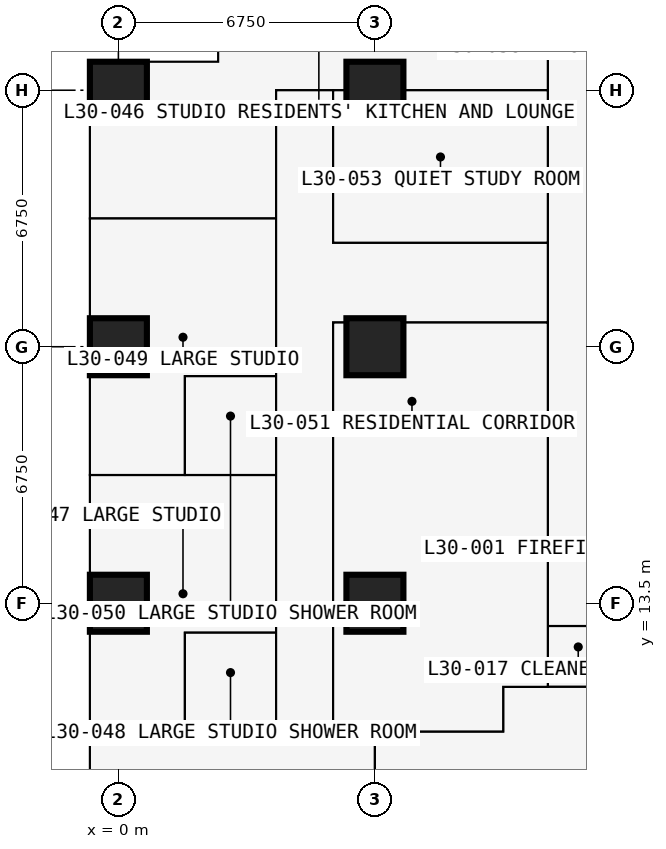
"""IFC4 building model, lengths in metres.
Left out: names, types, materials, properties, quantities, classifications, styles, units other than length and angle.
Written with IfcOpenShell. Run it as: python <this file> out.ifc"""

import sys

from ifc_helpers import new_model, si_unit, direction, frame, frame_2d, origin, origin_2d, place, context, subcontext, project, spatial, rectangle, extrude, element, fill, save


model = new_model("IFC4")
c1 = context("Model", 3, precision=1e-05, world=origin(), true_north=direction((0.0, 1.0)))
c2 = subcontext(c1, "Body", "Model", "MODEL_VIEW")
j1 = project(units=[si_unit("LENGTHUNIT", "METRE"), si_unit("PLANEANGLEUNIT", "RADIAN")], contexts=[c1])
p1 = place(None, origin())
s1 = spatial("IfcSite", under=j1, at=p1, CompositionType="ELEMENT")
p2 = place(p1, origin())
s2 = spatial("IfcBuilding", under=s1, at=p2, CompositionType="ELEMENT")
p3 = place(p2, frame((0.0, 0.0, 112.5)))
s3 = spatial("IfcBuildingStorey", under=s2, at=p3, CompositionType="ELEMENT", Elevation=112.5)
for number, where, z_axis, x_axis in (
    (1, (0.0, 13.5, 0.0), (0.0, 0.0, 1.0), (1.0, 0.0, 0.0)),
    (2, (0.0, 20.25, 0.0), (0.0, 0.0, 1.0), (1.0, 0.0, 0.0)),
    (3, (0.0, 27.0, 0.0), (0.0, 0.0, 1.0), (1.0, 0.0, 0.0)),
    (4, (6.75, 13.5, 0.0), (0.0, 0.0, 1.0), (1.0, 0.0, 0.0)),
    (5, (6.75, 20.25, 0.0), (0.0, 0.0, 1.0), (1.0, 0.0, 0.0)),
    (6, (6.75, 27.0, 0.0), (0.0, 0.0, 1.0), (1.0, 0.0, 0.0)),
):
    element("IfcColumn", number, at=place(p3, frame(where, z_axis=z_axis, x_axis=x_axis)), inside=s3, PredefinedType="COLUMN", context=c2, shape_type="SweptSolid", body=[
        extrude(rectangle(XDim=1.5, YDim=1.5, at=origin_2d()), origin(), (0.0, 0.0, 1.0), 3.6),
    ])
p4 = place(p3, frame((2.625, 31.125, 0.0), z_axis=(0.0, 0.0, 1.0), x_axis=(0.0, -1.0, 0.0)))
e7 = element("IfcWall", 7, at=p4, inside=s3, PredefinedType="SOLIDWALL", context=c2, shape_type="SweptSolid", body=[
    extrude(rectangle(XDim=3.375, YDim=0.3, at=frame_2d((1.688, 0.0))), origin(), (0.0, 0.0, 1.0), 3.375),
])
p5 = place(p4, frame((0.788, 0.0, 0.6)))
e8 = element("IfcOpeningElement", 8, at=p5, cuts=e7, PredefinedType="OPENING", context=c2, shape_type="SweptSolid", body=[
    extrude(rectangle(XDim=1.8, YDim=2.1, at=frame_2d((0.9, 1.05))), frame((0.0, 0.16, 0.0), z_axis=(0.0, -1.0, 0.0), x_axis=(1.0, 0.0, 0.0)), (0.0, 0.0, 1.0), 0.32),
])
p6 = place(p3, frame((2.625, 27.75, 0.0), z_axis=(0.0, 0.0, 1.0), x_axis=(-1.0, 0.0, 0.0)))
e9 = element("IfcWall", 9, at=p6, inside=s3, PredefinedType="SOLIDWALL", context=c2, shape_type="SweptSolid", body=[
    extrude(rectangle(XDim=3.375, YDim=0.3, at=frame_2d((1.688, 0.0))), origin(), (0.0, 0.0, 1.0), 3.375),
])
p7 = place(p6, frame((0.268, 0.0, 0.9)))
e10 = element("IfcOpeningElement", 10, at=p7, cuts=e9, PredefinedType="OPENING", context=c2, shape_type="SweptSolid", body=[
    extrude(rectangle(XDim=1.5, YDim=1.8, at=frame_2d((0.75, 0.9))), frame((0.0, 0.16, 0.0), z_axis=(0.0, -1.0, 0.0), x_axis=(1.0, 0.0, 0.0)), (0.0, 0.0, 1.0), 0.32),
])
p8 = place(p3, frame((-0.734, 10.125, 0.0), z_axis=(0.0, 0.0, 1.0), x_axis=(1.0, 0.0, 0.0)))
e11 = element("IfcWall", 11, at=p8, inside=s3, PredefinedType="PARTITIONING", context=c2, shape_type="SweptSolid", body=[
    extrude(rectangle(XDim=10.859, YDim=0.15, at=frame_2d((5.429, 0.0))), origin(), (0.0, 0.0, 1.0), 3.375),
])
p9 = place(p3, frame((-0.734, 16.875, 0.0), z_axis=(0.0, 0.0, 1.0), x_axis=(1.0, 0.0, 0.0)))
e12 = element("IfcWall", 12, at=p9, inside=s3, PredefinedType="PARTITIONING", context=c2, shape_type="SweptSolid", body=[
    extrude(rectangle(XDim=4.884, YDim=0.175, at=frame_2d((2.442, 0.0))), origin(), (0.0, 0.0, 1.0), 3.375),
])
p10 = place(p9, frame((3.234, 0.0, 0.0)))
e13 = element("IfcOpeningElement", 13, at=p10, cuts=e12, PredefinedType="OPENING", context=c2, shape_type="SweptSolid", body=[
    extrude(rectangle(XDim=0.9, YDim=2.2, at=frame_2d((0.45, 1.1))), frame((0.0, 0.097, 0.0), z_axis=(0.0, -1.0, 0.0), x_axis=(1.0, 0.0, 0.0)), (0.0, 0.0, 1.0), 0.195),
])
p11 = place(p3, frame((-0.734, 23.625, 0.0), z_axis=(0.0, 0.0, 1.0), x_axis=(1.0, 0.0, 0.0)))
e14 = element("IfcWall", 14, at=p11, inside=s3, PredefinedType="PARTITIONING", context=c2, shape_type="SweptSolid", body=[
    extrude(rectangle(XDim=4.884, YDim=0.15, at=frame_2d((2.442, 0.0))), origin(), (0.0, 0.0, 1.0), 3.375),
])
p12 = place(p3, frame((1.75, 10.125, 0.0), z_axis=(0.0, 0.0, 1.0), x_axis=(0.0, 1.0, 0.0)))
e15 = element("IfcWall", 15, at=p12, inside=s3, PredefinedType="PARTITIONING", context=c2, shape_type="SweptSolid", body=[
    extrude(rectangle(XDim=2.6, YDim=0.1, at=frame_2d((1.3, 0.0))), origin(), (0.0, 0.0, 1.0), 3.375),
])
p13 = place(p12, frame((0.85, 0.0, 0.0)))
e16 = element("IfcOpeningElement", 16, at=p13, cuts=e15, PredefinedType="OPENING", context=c2, shape_type="SweptSolid", body=[
    extrude(rectangle(XDim=0.9, YDim=2.2, at=frame_2d((0.45, 1.1))), frame((0.0, 0.06, 0.0), z_axis=(0.0, -1.0, 0.0), x_axis=(1.0, 0.0, 0.0)), (0.0, 0.0, 1.0), 0.12),
])
p14 = place(p3, frame((1.75, 12.725, 0.0), z_axis=(0.0, 0.0, 1.0), x_axis=(1.0, 0.0, 0.0)))
e17 = element("IfcWall", 17, at=p14, inside=s3, PredefinedType="PARTITIONING", context=c2, shape_type="SweptSolid", body=[
    extrude(rectangle(XDim=2.4, YDim=0.1, at=frame_2d((1.2, 0.0))), origin(), (0.0, 0.0, 1.0), 3.375),
])
p15 = place(p3, frame((1.75, 16.875, 0.0), z_axis=(0.0, 0.0, 1.0), x_axis=(0.0, 1.0, 0.0)))
e18 = element("IfcWall", 18, at=p15, inside=s3, PredefinedType="PARTITIONING", context=c2, shape_type="SweptSolid", body=[
    extrude(rectangle(XDim=2.6, YDim=0.1, at=frame_2d((1.3, 0.0))), origin(), (0.0, 0.0, 1.0), 3.375),
])
p16 = place(p3, frame((1.75, 19.475, 0.0), z_axis=(0.0, 0.0, 1.0), x_axis=(1.0, 0.0, 0.0)))
e19 = element("IfcWall", 19, at=p16, inside=s3, PredefinedType="PARTITIONING", context=c2, shape_type="SweptSolid", body=[
    extrude(rectangle(XDim=2.4, YDim=0.1, at=frame_2d((1.2, 0.0))), origin(), (0.0, 0.0, 1.0), 3.375),
])
p17 = place(p3, frame((4.15, 10.125, 0.0), z_axis=(0.0, 0.0, 1.0), x_axis=(0.0, 1.0, 0.0)))
e20 = element("IfcWall", 20, at=p17, inside=s3, PredefinedType="PARTITIONING", context=c2, shape_type="SweptSolid", body=[
    extrude(rectangle(XDim=16.875, YDim=0.1, at=frame_2d((8.438, 0.0))), origin(), (0.0, 0.0, 1.0), 3.375),
])
p18 = place(p17, frame((4.2, 0.0, 0.0)))
e21 = element("IfcOpeningElement", 21, at=p18, cuts=e20, PredefinedType="OPENING", context=c2, shape_type="SweptSolid", body=[
    extrude(rectangle(XDim=0.95, YDim=2.2, at=frame_2d((0.475, 1.1))), frame((0.0, 0.06, 0.0), z_axis=(0.0, -1.0, 0.0), x_axis=(1.0, 0.0, 0.0)), (0.0, 0.0, 1.0), 0.12),
])
p19 = place(p17, frame((10.95, 0.0, 0.0)))
e22 = element("IfcOpeningElement", 22, at=p19, cuts=e20, PredefinedType="OPENING", context=c2, shape_type="SweptSolid", body=[
    extrude(rectangle(XDim=0.95, YDim=2.2, at=frame_2d((0.475, 1.1))), frame((0.0, 0.06, 0.0), z_axis=(0.0, -1.0, 0.0), x_axis=(1.0, 0.0, 0.0)), (0.0, 0.0, 1.0), 0.12),
])
p20 = place(p3, frame((4.15, 27.0, 0.0), z_axis=(0.0, 0.0, 1.0), x_axis=(1.0, 0.0, 0.0)))
e23 = element("IfcWall", 23, at=p20, inside=s3, PredefinedType="PARTITIONING", context=c2, shape_type="SweptSolid", body=[
    extrude(rectangle(XDim=7.15, YDim=0.15, at=frame_2d((3.575, 0.0))), origin(), (0.0, 0.0, 1.0), 2.806),
])
p21 = place(p3, frame((5.65, 10.125, 0.0), z_axis=(0.0, 0.0, 1.0), x_axis=(0.0, 1.0, 0.0)))
e24 = element("IfcWall", 24, at=p21, inside=s3, PredefinedType="PARTITIONING", context=c2, shape_type="SweptSolid", body=[
    extrude(rectangle(XDim=10.762, YDim=0.15, at=frame_2d((5.381, 0.0))), origin(), (0.0, 0.0, 1.0), 3.375),
])
p22 = place(p21, frame((4.9, 0.0, 0.0)))
e25 = element("IfcOpeningElement", 25, at=p22, cuts=e24, PredefinedType="OPENING", context=c2, shape_type="SweptSolid", body=[
    extrude(rectangle(XDim=0.95, YDim=2.2, at=frame_2d((0.475, 1.1))), frame((0.0, 0.085, 0.0), z_axis=(0.0, -1.0, 0.0), x_axis=(1.0, 0.0, 0.0)), (0.0, 0.0, 1.0), 0.17),
])
p23 = place(p3, frame((5.65, 20.887, 0.0), z_axis=(0.0, 0.0, 1.0), x_axis=(1.0, 0.0, 0.0)))
e26 = element("IfcWall", 26, at=p23, inside=s3, PredefinedType="PARTITIONING", context=c2, shape_type="SweptSolid", body=[
    extrude(rectangle(XDim=5.65, YDim=0.15, at=frame_2d((2.825, 0.0))), origin(), (0.0, 0.0, 1.0), 3.375),
])
p24 = place(p3, frame((5.65, 22.988, 0.0), z_axis=(0.0, 0.0, 1.0), x_axis=(0.0, 1.0, 0.0)))
e27 = element("IfcWall", 27, at=p24, inside=s3, PredefinedType="PARTITIONING", context=c2, shape_type="SweptSolid", body=[
    extrude(rectangle(XDim=4.012, YDim=0.15, at=frame_2d((2.006, 0.0))), origin(), (0.0, 0.0, 1.0), 3.375),
])
p25 = place(p3, frame((5.65, 22.988, 0.0), z_axis=(0.0, 0.0, 1.0), x_axis=(1.0, 0.0, 0.0)))
e28 = element("IfcWall", 28, at=p25, inside=s3, PredefinedType="PARTITIONING", context=c2, shape_type="SweptSolid", body=[
    extrude(rectangle(XDim=5.65, YDim=0.15, at=frame_2d((2.825, 0.0))), origin(), (0.0, 0.0, 1.0), 3.375),
])
p26 = place(p25, frame((2.35, 0.0, 0.0)))
e29 = element("IfcOpeningElement", 29, at=p26, cuts=e28, PredefinedType="OPENING", context=c2, shape_type="SweptSolid", body=[
    extrude(rectangle(XDim=0.95, YDim=2.2, at=frame_2d((0.475, 1.1))), frame((0.0, 0.085, 0.0), z_axis=(0.0, -1.0, 0.0), x_axis=(1.0, 0.0, 0.0)), (0.0, 0.0, 1.0), 0.17),
])
p27 = place(p3, frame((6.75, 4.15, 0.0), z_axis=(0.0, 0.0, 1.0), x_axis=(0.0, 1.0, 0.0)))
e30 = element("IfcWall", 30, at=p27, inside=s3, PredefinedType="PARTITIONING", context=c2, shape_type="SweptSolid", body=[
    extrude(rectangle(XDim=5.975, YDim=0.15, at=frame_2d((2.988, 0.0))), origin(), (0.0, 0.0, 1.0), 2.877),
])
p28 = place(p3, frame((10.125, 10.125, 0.0), z_axis=(0.0, 0.0, 1.0), x_axis=(0.0, 1.0, 0.0)))
e31 = element("IfcWall", 31, at=p28, inside=s3, PredefinedType="PARTITIONING", context=c2, shape_type="SweptSolid", body=[
    extrude(rectangle(XDim=1.175, YDim=0.15, at=frame_2d((0.587, 0.0))), origin(), (0.0, 0.0, 1.0), 3.375),
])
p29 = place(p3, frame((10.125, 11.3, 0.0), z_axis=(0.0, 0.0, 1.0), x_axis=(1.0, 0.0, 0.0)))
e32 = element("IfcWall", 32, at=p29, inside=s3, PredefinedType="PARTITIONING", context=c2, shape_type="SweptSolid", body=[
    extrude(rectangle(XDim=20.675, YDim=0.15, at=frame_2d((10.337, 0.0))), origin(), (0.0, 0.0, 1.0), 3.375),
])
p30 = place(p29, frame((11.312, 0.0, 0.0)))
e33 = element("IfcOpeningElement", 33, at=p30, cuts=e32, PredefinedType="OPENING", context=c2, shape_type="SweptSolid", body=[
    extrude(rectangle(XDim=1.0, YDim=2.2, at=frame_2d((0.5, 1.1))), frame((0.0, 0.085, 0.0), z_axis=(0.0, -1.0, 0.0), x_axis=(1.0, 0.0, 0.0)), (0.0, 0.0, 1.0), 0.17),
])
p31 = place(p3, frame((11.3, 11.3, 0.0), z_axis=(0.0, 0.0, 1.0), x_axis=(0.0, 1.0, 0.0)))
e34 = element("IfcWall", 34, at=p31, inside=s3, PredefinedType="PARTITIONING", context=c2, shape_type="SweptSolid", body=[
    extrude(rectangle(XDim=19.3, YDim=0.15, at=frame_2d((9.65, 0.0))), origin(), (0.0, 0.0, 1.0), 3.375),
])
p32 = place(p31, frame((18.1, 0.0, 0.0)))
e35 = element("IfcOpeningElement", 35, at=p32, cuts=e34, PredefinedType="OPENING", context=c2, shape_type="SweptSolid", body=[
    extrude(rectangle(XDim=1.0, YDim=2.2, at=frame_2d((0.5, 1.1))), frame((0.0, 0.085, 0.0), z_axis=(0.0, -1.0, 0.0), x_axis=(1.0, 0.0, 0.0)), (0.0, 0.0, 1.0), 0.17),
])
p33 = place(p31, frame((10.137, 0.0, 0.0)))
e36 = element("IfcOpeningElement", 36, at=p33, cuts=e34, PredefinedType="OPENING", context=c2, shape_type="SweptSolid", body=[
    extrude(rectangle(XDim=1.0, YDim=2.2, at=frame_2d((0.5, 1.1))), frame((0.0, 0.085, 0.0), z_axis=(0.0, -1.0, 0.0), x_axis=(1.0, 0.0, 0.0)), (0.0, 0.0, 1.0), 0.17),
])
p34 = place(p3, frame((11.3, 12.9, 0.0), z_axis=(0.0, 0.0, 1.0), x_axis=(1.0, 0.0, 0.0)))
e37 = element("IfcWall", 37, at=p34, inside=s3, PredefinedType="PARTITIONING", context=c2, shape_type="SweptSolid", body=[
    extrude(rectangle(XDim=1.6, YDim=0.15, at=frame_2d((0.8, 0.0))), origin(), (0.0, 0.0, 1.0), 2.806),
])
p35 = place(p34, frame((0.3, 0.0, 0.0)))
e38 = element("IfcOpeningElement", 38, at=p35, cuts=e37, PredefinedType="OPENING", context=c2, shape_type="SweptSolid", body=[
    extrude(rectangle(XDim=0.95, YDim=2.2, at=frame_2d((0.475, 1.1))), frame((0.0, 0.085, 0.0), z_axis=(0.0, -1.0, 0.0), x_axis=(1.0, 0.0, 0.0)), (0.0, 0.0, 1.0), 0.17),
])
p36 = place(p7, origin())
e39 = element("IfcWindow", 39, at=p36, inside=s3, PartitioningType="SINGLE_PANEL", PredefinedType="WINDOW", context=c2, shape_type="SweptSolid", body=[
    extrude(rectangle(XDim=1.5, YDim=1.8, at=frame_2d((0.75, 0.9))), frame((0.0, 0.03, 0.0), z_axis=(0.0, -1.0, 0.0), x_axis=(1.0, 0.0, 0.0)), (0.0, 0.0, 1.0), 0.06),
])
fill(e10, e39)
p37 = place(p35, origin())
e40 = element("IfcDoor", 40, at=p37, inside=s3, OperationType="SINGLE_SWING_LEFT", PredefinedType="DOOR", context=c2, shape_type="SweptSolid", body=[
    extrude(rectangle(XDim=0.95, YDim=2.2, at=frame_2d((0.475, 1.1))), frame((0.0, 0.025, 0.0), z_axis=(0.0, -1.0, 0.0), x_axis=(1.0, 0.0, 0.0)), (0.0, 0.0, 1.0), 0.05),
])
fill(e38, e40)
p38 = place(p18, origin())
e41 = element("IfcDoor", 41, at=p38, inside=s3, OperationType="SINGLE_SWING_LEFT", PredefinedType="DOOR", context=c2, shape_type="SweptSolid", body=[
    extrude(rectangle(XDim=0.95, YDim=2.2, at=frame_2d((0.475, 1.1))), frame((0.0, 0.025, 0.0), z_axis=(0.0, -1.0, 0.0), x_axis=(1.0, 0.0, 0.0)), (0.0, 0.0, 1.0), 0.05),
])
fill(e21, e41)
p39 = place(p13, origin())
e42 = element("IfcDoor", 42, at=p39, inside=s3, OperationType="SINGLE_SWING_RIGHT", PredefinedType="DOOR", context=c2, shape_type="SweptSolid", body=[
    extrude(rectangle(XDim=0.9, YDim=2.2, at=frame_2d((0.45, 1.1))), frame((0.0, 0.025, 0.0), z_axis=(0.0, -1.0, 0.0), x_axis=(1.0, 0.0, 0.0)), (0.0, 0.0, 1.0), 0.05),
])
fill(e16, e42)
p40 = place(p19, origin())
e43 = element("IfcDoor", 43, at=p40, inside=s3, OperationType="SINGLE_SWING_LEFT", PredefinedType="DOOR", context=c2, shape_type="SweptSolid", body=[
    extrude(rectangle(XDim=0.95, YDim=2.2, at=frame_2d((0.475, 1.1))), frame((0.0, 0.025, 0.0), z_axis=(0.0, -1.0, 0.0), x_axis=(1.0, 0.0, 0.0)), (0.0, 0.0, 1.0), 0.05),
])
fill(e22, e43)
p41 = place(p10, origin())
e44 = element("IfcDoor", 44, at=p41, inside=s3, OperationType="SINGLE_SWING_RIGHT", PredefinedType="DOOR", context=c2, shape_type="SweptSolid", body=[
    extrude(rectangle(XDim=0.9, YDim=2.2, at=frame_2d((0.45, 1.1))), frame((0.0, 0.025, 0.0), z_axis=(0.0, -1.0, 0.0), x_axis=(1.0, 0.0, 0.0)), (0.0, 0.0, 1.0), 0.05),
])
fill(e13, e44)
p42 = place(p33, origin())
e45 = element("IfcDoor", 45, at=p42, inside=s3, OperationType="SINGLE_SWING_LEFT", PredefinedType="DOOR", context=c2, shape_type="SweptSolid", body=[
    extrude(rectangle(XDim=1.0, YDim=2.2, at=frame_2d((0.5, 1.1))), frame((0.0, 0.025, 0.0), z_axis=(0.0, -1.0, 0.0), x_axis=(1.0, 0.0, 0.0)), (0.0, 0.0, 1.0), 0.05),
])
fill(e36, e45)
p43 = place(p22, origin())
e46 = element("IfcDoor", 46, at=p43, inside=s3, OperationType="SINGLE_SWING_LEFT", PredefinedType="DOOR", context=c2, shape_type="SweptSolid", body=[
    extrude(rectangle(XDim=0.95, YDim=2.2, at=frame_2d((0.475, 1.1))), frame((0.0, 0.025, 0.0), z_axis=(0.0, -1.0, 0.0), x_axis=(1.0, 0.0, 0.0)), (0.0, 0.0, 1.0), 0.05),
])
fill(e25, e46)
p44 = place(p26, origin())
e47 = element("IfcDoor", 47, at=p44, inside=s3, OperationType="SINGLE_SWING_LEFT", PredefinedType="DOOR", context=c2, shape_type="SweptSolid", body=[
    extrude(rectangle(XDim=0.95, YDim=2.2, at=frame_2d((0.475, 1.1))), frame((0.0, 0.025, 0.0), z_axis=(0.0, -1.0, 0.0), x_axis=(1.0, 0.0, 0.0)), (0.0, 0.0, 1.0), 0.05),
])
fill(e29, e47)
save(model, sys.argv[1])
